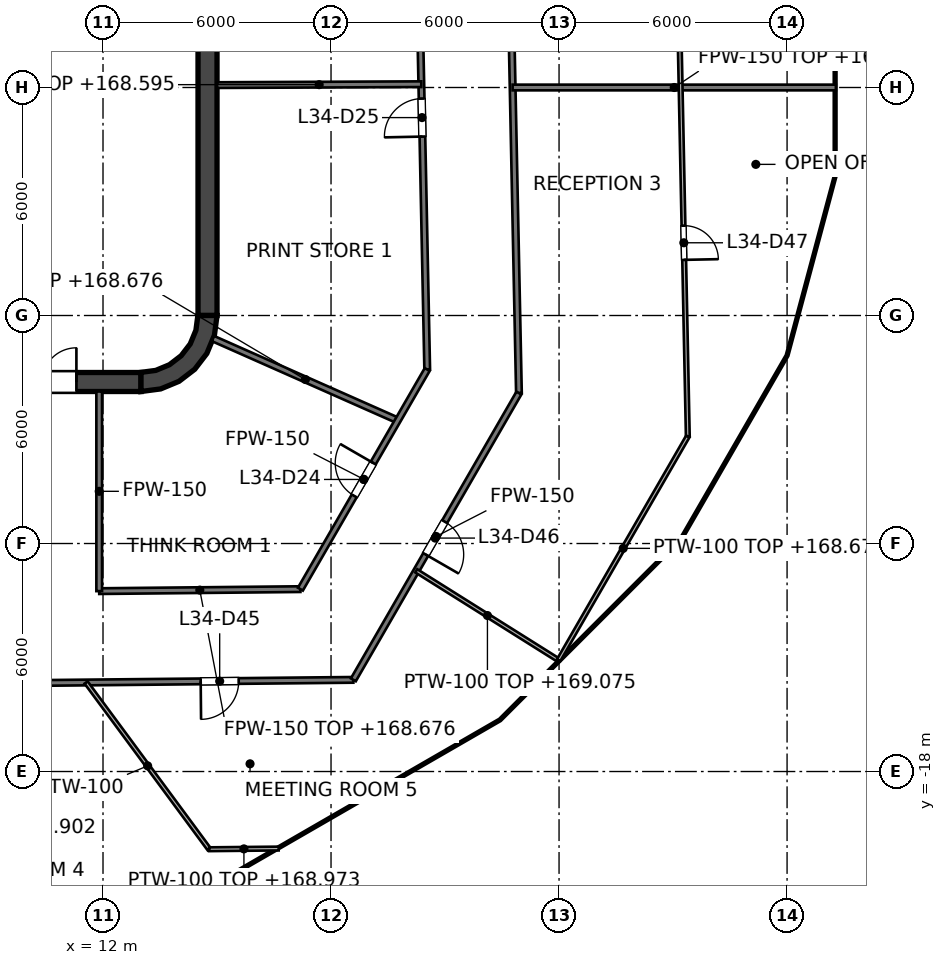
"""IFC4 building model, lengths in metres.
Left out: names, types, materials, properties, quantities, classifications, styles, units other than length and angle.
Written with IfcOpenShell. Run it as: python <this file> out.ifc"""

import sys

from ifc_helpers import new_model, si_unit, direction, frame, frame_2d, origin, place, context, subcontext, project, spatial, polyline, rectangle, outline, extrude, element, fill, save


model = new_model("IFC4")
c1 = context("Model", 3, precision=1e-05, world=origin(), true_north=direction((0.0, 1.0)))
c2 = subcontext(c1, "Body", "Model", "MODEL_VIEW")
j1 = project(units=[si_unit("LENGTHUNIT", "METRE"), si_unit("PLANEANGLEUNIT", "RADIAN")], contexts=[c1])
p1 = place(None, origin())
s1 = spatial("IfcSite", under=j1, at=p1, CompositionType="ELEMENT")
p2 = place(p1, origin())
s2 = spatial("IfcBuilding", under=s1, at=p2, CompositionType="ELEMENT")
p3 = place(p2, frame((0.0, 0.0, 165.6)))
s3 = spatial("IfcBuildingStorey", under=s2, at=p3, CompositionType="ELEMENT", Elevation=165.6)
p4 = place(p3, frame((-13.0, -7.75, 0.0), z_axis=(0.0, 0.0, 1.0), x_axis=(1.0, 0.0, 0.0)))
e1 = element("IfcWall", 1, at=p4, inside=s3, PredefinedType="SHEAR", context=c2, shape_type="SweptSolid", body=[
    extrude(rectangle(XDim=26.0, YDim=0.5, at=frame_2d((13.0, 0.0))), origin(), (0.0, 0.0, 1.0), 4.0),
])
p5 = place(p4, frame((1.7, 0.0, 0.0)))
e2 = element("IfcOpeningElement", 2, at=p5, cuts=e1, PredefinedType="OPENING", context=c2, shape_type="SweptSolid", body=[
    extrude(rectangle(XDim=1.8, YDim=2.1, at=frame_2d((0.9, 1.05))), frame((0.0, 0.25, 0.0), z_axis=(0.0, -1.0, 0.0), x_axis=(1.0, 0.0, 0.0)), (0.0, 0.0, 1.0), 0.5),
])
p6 = place(p4, frame((22.5, 0.0, 0.0)))
e3 = element("IfcOpeningElement", 3, at=p6, cuts=e1, PredefinedType="OPENING", context=c2, shape_type="SweptSolid", body=[
    extrude(rectangle(XDim=1.8, YDim=2.1, at=frame_2d((0.9, 1.05))), frame((0.0, 0.25, 0.0), z_axis=(0.0, -1.0, 0.0), x_axis=(1.0, 0.0, 0.0)), (0.0, 0.0, 1.0), 0.5),
])
p7 = place(p3, frame((14.75, -6.0, 0.0), z_axis=(0.0, 0.0, 1.0), x_axis=(0.0, 1.0, 0.0)))
e4 = element("IfcWall", 4, at=p7, inside=s3, PredefinedType="SHEAR", context=c2, shape_type="SweptSolid", body=[
    extrude(rectangle(XDim=12.0, YDim=0.5, at=frame_2d((6.0, 0.0))), origin(), (0.0, 0.0, 1.0), 4.0),
])
p8 = place(p3, origin())
e5 = element("IfcWall", 5, at=p8, inside=s3, PredefinedType="SHEAR", context=c2, shape_type="SweptSolid", body=[
    extrude(outline(polyline([(15.0, -6.0), (14.496, -6.0), (14.445, -6.387), (14.295, -6.748), (14.058, -7.058), (13.748, -7.295), (13.387, -7.445), (13.0, -7.496), (13.0, -8.0), (13.518, -7.932), (14.0, -7.732), (14.414, -7.414), (14.732, -7.0), (14.932, -6.518), (15.0, -6.0)])), origin(), (0.0, 0.0, 1.0), 4.0),
])
p9 = place(p3, frame((11.8, -7.5, 0.0), z_axis=(0.0, 0.0, 1.0), x_axis=(0.0, 1.0, 0.0)))
e6 = element("IfcWall", 6, at=p9, inside=s3, PredefinedType="SOLIDWALL", context=c2, shape_type="SweptSolid", body=[
    extrude(rectangle(XDim=15.0, YDim=0.4, at=frame_2d((7.5, 0.0))), origin(), (0.0, 0.0, 1.0), 3.85),
])
p10 = place(p9, frame((11.3, 0.0, 0.0)))
e7 = element("IfcOpeningElement", 7, at=p10, cuts=e6, PredefinedType="OPENING", context=c2, shape_type="SweptSolid", body=[
    extrude(rectangle(XDim=1.1, YDim=2.1, at=frame_2d((0.55, 1.05))), frame((0.0, 0.2, 0.0), z_axis=(0.0, -1.0, 0.0), x_axis=(1.0, 0.0, 0.0)), (0.0, 0.0, 1.0), 0.4),
])
p11 = place(p9, frame((8.4, 0.0, 0.0)))
e8 = element("IfcOpeningElement", 8, at=p11, cuts=e6, PredefinedType="OPENING", context=c2, shape_type="SweptSolid", body=[
    extrude(rectangle(XDim=1.1, YDim=2.1, at=frame_2d((0.55, 1.05))), frame((0.0, 0.2, 0.0), z_axis=(0.0, -1.0, 0.0), x_axis=(1.0, 0.0, 0.0)), (0.0, 0.0, 1.0), 0.4),
])
p12 = place(p9, frame((5.5, 0.0, 0.0)))
e9 = element("IfcOpeningElement", 9, at=p12, cuts=e6, PredefinedType="OPENING", context=c2, shape_type="SweptSolid", body=[
    extrude(rectangle(XDim=1.1, YDim=2.1, at=frame_2d((0.55, 1.05))), frame((0.0, 0.2, 0.0), z_axis=(0.0, -1.0, 0.0), x_axis=(1.0, 0.0, 0.0)), (0.0, 0.0, 1.0), 0.4),
])
p13 = place(p9, frame((13.697, 0.0, 0.0)))
e10 = element("IfcOpeningElement", 10, at=p13, cuts=e6, PredefinedType="OPENING", context=c2, shape_type="SweptSolid", body=[
    extrude(rectangle(XDim=0.9, YDim=2.1, at=frame_2d((0.45, 1.05))), frame((0.0, 0.2, 0.0), z_axis=(0.0, -1.0, 0.0), x_axis=(1.0, 0.0, 0.0)), (0.0, 0.0, 1.0), 0.4),
])
p14 = place(p9, frame((0.403, 0.0, 0.0)))
e11 = element("IfcOpeningElement", 11, at=p14, cuts=e6, PredefinedType="OPENING", context=c2, shape_type="SweptSolid", body=[
    extrude(rectangle(XDim=0.9, YDim=2.1, at=frame_2d((0.45, 1.05))), frame((0.0, 0.2, 0.0), z_axis=(0.0, -1.0, 0.0), x_axis=(1.0, 0.0, 0.0)), (0.0, 0.0, 1.0), 0.4),
])
e12 = element("IfcWall", 12, at=p8, inside=s3, PredefinedType="SOLIDWALL", context=c2, shape_type="SweptSolid", body=[
    extrude(outline(polyline([(12.0, -5.675), (12.0, -5.925), (14.25, -5.925), (14.5, -5.925), (14.5, -5.675), (14.5, -3.025), (14.5, -2.775), (14.5, -0.125), (14.5, 0.125), (14.5, 2.775), (14.5, 3.025), (14.5, 5.675), (14.5, 5.925), (14.25, 5.925), (12.0, 5.925), (12.0, 5.675), (14.25, 5.675), (14.25, 3.025), (12.0, 3.025), (12.0, 2.775), (14.25, 2.775), (14.25, 0.125), (12.0, 0.125), (12.0, -0.125), (14.25, -0.125), (14.25, -2.775), (12.0, -2.775), (12.0, -3.025), (14.25, -3.025), (14.25, -5.675), (12.0, -5.675)])), origin(), (0.0, 0.0, 1.0), 3.85),
])
p15 = place(p3, frame((20.167, 10.213, 0.0), z_axis=(0.0, 0.0, 1.0), x_axis=(0.020638567039, -0.999787002091, 0.0)))
e13 = element("IfcWall", 13, at=p15, inside=s3, PredefinedType="PARTITIONING", context=c2, shape_type="SweptSolid", body=[
    extrude(rectangle(XDim=17.637, YDim=0.15, at=frame_2d((8.819, 0.0))), origin(), (0.0, 0.0, 1.0), 2.927),
])
p16 = place(p15, frame((10.507, 0.0, 0.0)))
e14 = element("IfcOpeningElement", 14, at=p16, cuts=e13, PredefinedType="OPENING", context=c2, shape_type="SweptSolid", body=[
    extrude(rectangle(XDim=1.0, YDim=2.1, at=frame_2d((0.5, 1.05))), frame((0.0, 0.075, 0.0), z_axis=(0.0, -1.0, 0.0), x_axis=(1.0, 0.0, 0.0)), (0.0, 0.0, 1.0), 0.15),
])
p17 = place(p15, frame((5.089, 0.0, 0.0)))
e15 = element("IfcOpeningElement", 15, at=p17, cuts=e13, PredefinedType="OPENING", context=c2, shape_type="SweptSolid", body=[
    extrude(rectangle(XDim=1.0, YDim=2.1, at=frame_2d((0.5, 1.05))), frame((0.0, 0.075, 0.0), z_axis=(0.0, -1.0, 0.0), x_axis=(1.0, 0.0, 0.0)), (0.0, 0.0, 1.0), 0.15),
])
p18 = place(p3, frame((22.539, 11.615, 0.0), z_axis=(0.0, 0.0, 1.0), x_axis=(0.020626332176, -0.99978725458, 0.0)))
e16 = element("IfcWall", 16, at=p18, inside=s3, PredefinedType="PARTITIONING", context=c2, shape_type="SweptSolid", body=[
    extrude(rectangle(XDim=19.66, YDim=0.15, at=frame_2d((9.83, 0.0))), origin(), (0.0, 0.0, 1.0), 2.927),
])
p19 = place(p18, frame((5.208, 0.0, 0.0)))
e17 = element("IfcOpeningElement", 17, at=p19, cuts=e16, PredefinedType="OPENING", context=c2, shape_type="SweptSolid", body=[
    extrude(rectangle(XDim=1.2, YDim=2.1, at=frame_2d((0.6, 1.05))), frame((0.0, 0.075, 0.0), z_axis=(0.0, -1.0, 0.0), x_axis=(1.0, 0.0, 0.0)), (0.0, 0.0, 1.0), 0.15),
])
p20 = place(p3, frame((14.895, -6.607, 0.0), z_axis=(0.0, 0.0, 1.0), x_axis=(0.914233271379, -0.405188259337, 0.0)))
e18 = element("IfcWall", 18, at=p20, inside=s3, PredefinedType="PARTITIONING", context=c2, shape_type="SweptSolid", body=[
    extrude(rectangle(XDim=5.317, YDim=0.15, at=frame_2d((2.659, 0.0))), origin(), (0.0, 0.0, 1.0), 3.076),
])
p21 = place(p3, frame((22.778, 0.0, 0.0), z_axis=(0.0, 0.0, 1.0), x_axis=(1.0, 0.0, 0.0)))
e19 = element("IfcWall", 19, at=p21, inside=s3, PredefinedType="PARTITIONING", context=c2, shape_type="SweptSolid", body=[
    extrude(rectangle(XDim=8.506, YDim=0.15, at=frame_2d((4.253, 0.0))), origin(), (0.0, 0.0, 1.0), 2.995),
])
p22 = place(p3, frame((15.0, 0.063, 0.0), z_axis=(0.0, 0.0, 1.0), x_axis=(0.999990294223, 0.004405843865, 0.0)))
e20 = element("IfcWall", 20, at=p22, inside=s3, PredefinedType="PARTITIONING", context=c2, shape_type="SweptSolid", body=[
    extrude(rectangle(XDim=5.375, YDim=0.15, at=frame_2d((2.688, 0.0))), origin(), (0.0, 0.0, 1.0), 2.995),
])
p23 = place(p3, frame((-14.534, -15.916, 0.0), z_axis=(0.0, 0.0, 1.0), x_axis=(0.999950930262, 0.009906415532, 0.0)))
e21 = element("IfcWall", 21, at=p23, inside=s3, PredefinedType="PARTITIONING", context=c2, shape_type="SweptSolid", body=[
    extrude(rectangle(XDim=33.123, YDim=0.15, at=frame_2d((16.561, 0.0))), origin(), (0.0, 0.0, 1.0), 2.927),
])
p24 = place(p23, frame((16.111, 0.0, 0.0)))
e22 = element("IfcOpeningElement", 22, at=p24, cuts=e21, PredefinedType="OPENING", context=c2, shape_type="SweptSolid", body=[
    extrude(rectangle(XDim=1.0, YDim=2.1, at=frame_2d((0.5, 1.05))), frame((0.0, 0.075, 0.0), z_axis=(0.0, -1.0, 0.0), x_axis=(1.0, 0.0, 0.0)), (0.0, 0.0, 1.0), 0.15),
])
p25 = place(p23, frame((21.869, 0.0, 0.0)))
e23 = element("IfcOpeningElement", 23, at=p25, cuts=e21, PredefinedType="OPENING", context=c2, shape_type="SweptSolid", body=[
    extrude(rectangle(XDim=1.0, YDim=2.1, at=frame_2d((0.5, 1.05))), frame((0.0, 0.075, 0.0), z_axis=(0.0, -1.0, 0.0), x_axis=(1.0, 0.0, 0.0)), (0.0, 0.0, 1.0), 0.15),
])
p26 = place(p23, frame((29.106, 0.0, 0.0)))
e24 = element("IfcOpeningElement", 24, at=p26, cuts=e21, PredefinedType="OPENING", context=c2, shape_type="SweptSolid", body=[
    extrude(rectangle(XDim=1.0, YDim=2.1, at=frame_2d((0.5, 1.05))), frame((0.0, 0.075, 0.0), z_axis=(0.0, -1.0, 0.0), x_axis=(1.0, 0.0, 0.0)), (0.0, 0.0, 1.0), 0.15),
])
p27 = place(p3, frame((11.9, -13.253, 0.0), z_axis=(0.0, 0.0, 1.0), x_axis=(0.999951309192, 0.009868092237, 0.0)))
e25 = element("IfcWall", 25, at=p27, inside=s3, PredefinedType="PARTITIONING", context=c2, shape_type="SweptSolid", body=[
    extrude(rectangle(XDim=5.294, YDim=0.15, at=frame_2d((2.647, 0.0))), origin(), (0.0, 0.0, 1.0), 3.076),
])
p28 = place(p3, frame((18.587, -15.587, 0.0), z_axis=(0.0, 0.0, 1.0), x_axis=(0.500026433136, 0.866010142069, 0.0)))
e26 = element("IfcWall", 26, at=p28, inside=s3, PredefinedType="PARTITIONING", context=c2, shape_type="SweptSolid", body=[
    extrude(rectangle(XDim=8.713, YDim=0.15, at=frame_2d((4.357, 0.0))), origin(), (0.0, 0.0, 1.0), 2.927),
])
p29 = place(p28, frame((3.807, 0.0, 0.0)))
e27 = element("IfcOpeningElement", 27, at=p29, cuts=e26, PredefinedType="OPENING", context=c2, shape_type="SweptSolid", body=[
    extrude(rectangle(XDim=1.0, YDim=2.1, at=frame_2d((0.5, 1.05))), frame((0.0, 0.075, 0.0), z_axis=(0.0, -1.0, 0.0), x_axis=(1.0, 0.0, 0.0)), (0.0, 0.0, 1.0), 0.15),
])
p30 = place(p3, frame((17.194, -13.201, 0.0), z_axis=(0.0, 0.0, 1.0), x_axis=(0.50001062018, 0.866019272134, 0.0)))
e28 = element("IfcWall", 28, at=p30, inside=s3, PredefinedType="PARTITIONING", context=c2, shape_type="SweptSolid", body=[
    extrude(rectangle(XDim=6.674, YDim=0.15, at=frame_2d((3.337, 0.0))), origin(), (0.0, 0.0, 1.0), 2.927),
])
p31 = place(p30, frame((2.833, 0.0, 0.0)))
e29 = element("IfcOpeningElement", 29, at=p31, cuts=e28, PredefinedType="OPENING", context=c2, shape_type="SweptSolid", body=[
    extrude(rectangle(XDim=1.0, YDim=2.1, at=frame_2d((0.5, 1.05))), frame((0.0, 0.075, 0.0), z_axis=(0.0, -1.0, 0.0), x_axis=(1.0, 0.0, 0.0)), (0.0, 0.0, 1.0), 0.15),
])
p32 = place(p3, frame((11.9, -13.253, 0.0), z_axis=(0.0, 0.0, 1.0), x_axis=(0.0, 1.0, 0.0)))
e30 = element("IfcWall", 30, at=p32, inside=s3, PredefinedType="PARTITIONING", context=c2, shape_type="SweptSolid", body=[
    extrude(rectangle(XDim=5.253, YDim=0.15, at=frame_2d((2.626, 0.0))), origin(), (0.0, 0.0, 1.0), 2.927),
])
p33 = place(p3, frame((26.949, 12.167, 0.0), z_axis=(0.0, 0.0, 1.0), x_axis=(0.020567403716, -0.999788468579, 0.0)))
e31 = element("IfcWall", 31, at=p33, inside=s3, PredefinedType="PARTITIONING", context=c2, shape_type="SweptSolid", body=[
    extrude(rectangle(XDim=21.355, YDim=0.1, at=frame_2d((10.677, 0.0))), origin(), (0.0, 0.0, 1.0), 2.927),
])
p34 = place(p33, frame((15.806, 0.0, 0.0)))
e32 = element("IfcOpeningElement", 32, at=p34, cuts=e31, PredefinedType="OPENING", context=c2, shape_type="SweptSolid", body=[
    extrude(rectangle(XDim=0.9, YDim=2.1, at=frame_2d((0.45, 1.05))), frame((0.0, 0.05, 0.0), z_axis=(0.0, -1.0, 0.0), x_axis=(1.0, 0.0, 0.0)), (0.0, 0.0, 1.0), 0.1),
])
p35 = place(p33, frame((7.447, 0.0, 0.0)))
e33 = element("IfcOpeningElement", 33, at=p35, cuts=e31, PredefinedType="OPENING", context=c2, shape_type="SweptSolid", body=[
    extrude(rectangle(XDim=0.9, YDim=2.1, at=frame_2d((0.45, 1.05))), frame((0.0, 0.05, 0.0), z_axis=(0.0, -1.0, 0.0), x_axis=(1.0, 0.0, 0.0)), (0.0, 0.0, 1.0), 0.1),
])
p36 = place(p3, frame((11.555, -15.657, 0.0), z_axis=(0.0, 0.0, 1.0), x_axis=(0.593887483444, -0.80454810733, 0.0)))
e34 = element("IfcWall", 34, at=p36, inside=s3, PredefinedType="PARTITIONING", context=c2, shape_type="SweptSolid", body=[
    extrude(rectangle(XDim=5.454, YDim=0.1, at=frame_2d((2.727, 0.0))), origin(), (0.0, 0.0, 1.0), 2.927),
])
p37 = place(p3, frame((20.243, -12.719, 0.0), z_axis=(0.0, 0.0, 1.0), x_axis=(0.846743117746, -0.532001966678, 0.0)))
e35 = element("IfcWall", 35, at=p37, inside=s3, PredefinedType="PARTITIONING", context=c2, shape_type="SweptSolid", body=[
    extrude(rectangle(XDim=4.423, YDim=0.1, at=frame_2d((2.211, 0.0))), origin(), (0.0, 0.0, 1.0), 3.475),
])
p38 = place(p3, frame((14.794, -20.045, 0.0), z_axis=(0.0, 0.0, 1.0), x_axis=(0.999952482553, 0.00974846838, 0.0)))
e36 = element("IfcWall", 36, at=p38, inside=s3, PredefinedType="PARTITIONING", context=c2, shape_type="SweptSolid", body=[
    extrude(rectangle(XDim=1.828, YDim=0.1, at=frame_2d((0.914, 0.0))), origin(), (0.0, 0.0, 1.0), 3.373),
])
p39 = place(p3, frame((23.988, -15.072, 0.0), z_axis=(0.0, 0.0, 1.0), x_axis=(0.500019768644, 0.866013990052, 0.0)))
e37 = element("IfcWall", 37, at=p39, inside=s3, PredefinedType="PARTITIONING", context=c2, shape_type="SweptSolid", body=[
    extrude(rectangle(XDim=6.8, YDim=0.1, at=frame_2d((3.4, 0.0))), origin(), (0.0, 0.0, 1.0), 3.076),
])
p40 = place(p11, origin())
e38 = element("IfcDoor", 38, at=p40, inside=s3, OperationType="DOUBLE_DOOR_SLIDING", PredefinedType="DOOR", context=c2, shape_type="SweptSolid", body=[
    extrude(rectangle(XDim=1.1, YDim=2.1, at=frame_2d((0.55, 1.05))), frame((0.0, 0.025, 0.0), z_axis=(0.0, -1.0, 0.0), x_axis=(1.0, 0.0, 0.0)), (0.0, 0.0, 1.0), 0.05),
])
fill(e8, e38)
p41 = place(p12, origin())
e39 = element("IfcDoor", 39, at=p41, inside=s3, OperationType="DOUBLE_DOOR_SLIDING", PredefinedType="DOOR", context=c2, shape_type="SweptSolid", body=[
    extrude(rectangle(XDim=1.1, YDim=2.1, at=frame_2d((0.55, 1.05))), frame((0.0, 0.025, 0.0), z_axis=(0.0, -1.0, 0.0), x_axis=(1.0, 0.0, 0.0)), (0.0, 0.0, 1.0), 0.05),
])
fill(e9, e39)
p42 = place(p14, origin())
e40 = element("IfcDoor", 40, at=p42, inside=s3, OperationType="SINGLE_SWING_RIGHT", PredefinedType="DOOR", context=c2, shape_type="SweptSolid", body=[
    extrude(rectangle(XDim=0.9, YDim=2.1, at=frame_2d((0.45, 1.05))), frame((0.0, 0.025, 0.0), z_axis=(0.0, -1.0, 0.0), x_axis=(1.0, 0.0, 0.0)), (0.0, 0.0, 1.0), 0.05),
])
fill(e11, e40)
p43 = place(p6, origin())
e41 = element("IfcDoor", 41, at=p43, inside=s3, OperationType="DOUBLE_DOOR_SINGLE_SWING", PredefinedType="DOOR", context=c2, shape_type="SweptSolid", body=[
    extrude(rectangle(XDim=1.8, YDim=2.1, at=frame_2d((0.9, 1.05))), frame((0.0, 0.025, 0.0), z_axis=(0.0, -1.0, 0.0), x_axis=(1.0, 0.0, 0.0)), (0.0, 0.0, 1.0), 0.05),
])
fill(e3, e41)
p44 = place(p31, origin())
e42 = element("IfcDoor", 42, at=p44, inside=s3, OperationType="SINGLE_SWING_RIGHT", PredefinedType="DOOR", context=c2, shape_type="SweptSolid", body=[
    extrude(rectangle(XDim=1.0, YDim=2.1, at=frame_2d((0.5, 1.05))), frame((0.0, 0.025, 0.0), z_axis=(0.0, -1.0, 0.0), x_axis=(1.0, 0.0, 0.0)), (0.0, 0.0, 1.0), 0.05),
])
fill(e29, e42)
p45 = place(p16, origin())
e43 = element("IfcDoor", 43, at=p45, inside=s3, OperationType="SINGLE_SWING_RIGHT", PredefinedType="DOOR", context=c2, shape_type="SweptSolid", body=[
    extrude(rectangle(XDim=1.0, YDim=2.1, at=frame_2d((0.5, 1.05))), frame((0.0, 0.025, 0.0), z_axis=(0.0, -1.0, 0.0), x_axis=(1.0, 0.0, 0.0)), (0.0, 0.0, 1.0), 0.05),
])
fill(e14, e43)
p46 = place(p26, origin())
e44 = element("IfcDoor", 44, at=p46, inside=s3, OperationType="SINGLE_SWING_LEFT", PredefinedType="DOOR", context=c2, shape_type="SweptSolid", body=[
    extrude(rectangle(XDim=1.0, YDim=2.1, at=frame_2d((0.5, 1.05))), frame((0.0, 0.025, 0.0), z_axis=(0.0, -1.0, 0.0), x_axis=(1.0, 0.0, 0.0)), (0.0, 0.0, 1.0), 0.05),
])
fill(e24, e44)
p47 = place(p29, origin())
e45 = element("IfcDoor", 45, at=p47, inside=s3, OperationType="SINGLE_SWING_LEFT", PredefinedType="DOOR", context=c2, shape_type="SweptSolid", body=[
    extrude(rectangle(XDim=1.0, YDim=2.1, at=frame_2d((0.5, 1.05))), frame((0.0, 0.025, 0.0), z_axis=(0.0, -1.0, 0.0), x_axis=(1.0, 0.0, 0.0)), (0.0, 0.0, 1.0), 0.05),
])
fill(e27, e45)
p48 = place(p34, origin())
e46 = element("IfcDoor", 46, at=p48, inside=s3, OperationType="SINGLE_SWING_RIGHT", PredefinedType="DOOR", context=c2, shape_type="SweptSolid", body=[
    extrude(rectangle(XDim=0.9, YDim=2.1, at=frame_2d((0.45, 1.05))), frame((0.0, 0.025, 0.0), z_axis=(0.0, -1.0, 0.0), x_axis=(1.0, 0.0, 0.0)), (0.0, 0.0, 1.0), 0.05),
])
fill(e32, e46)
save(model, sys.argv[1])
